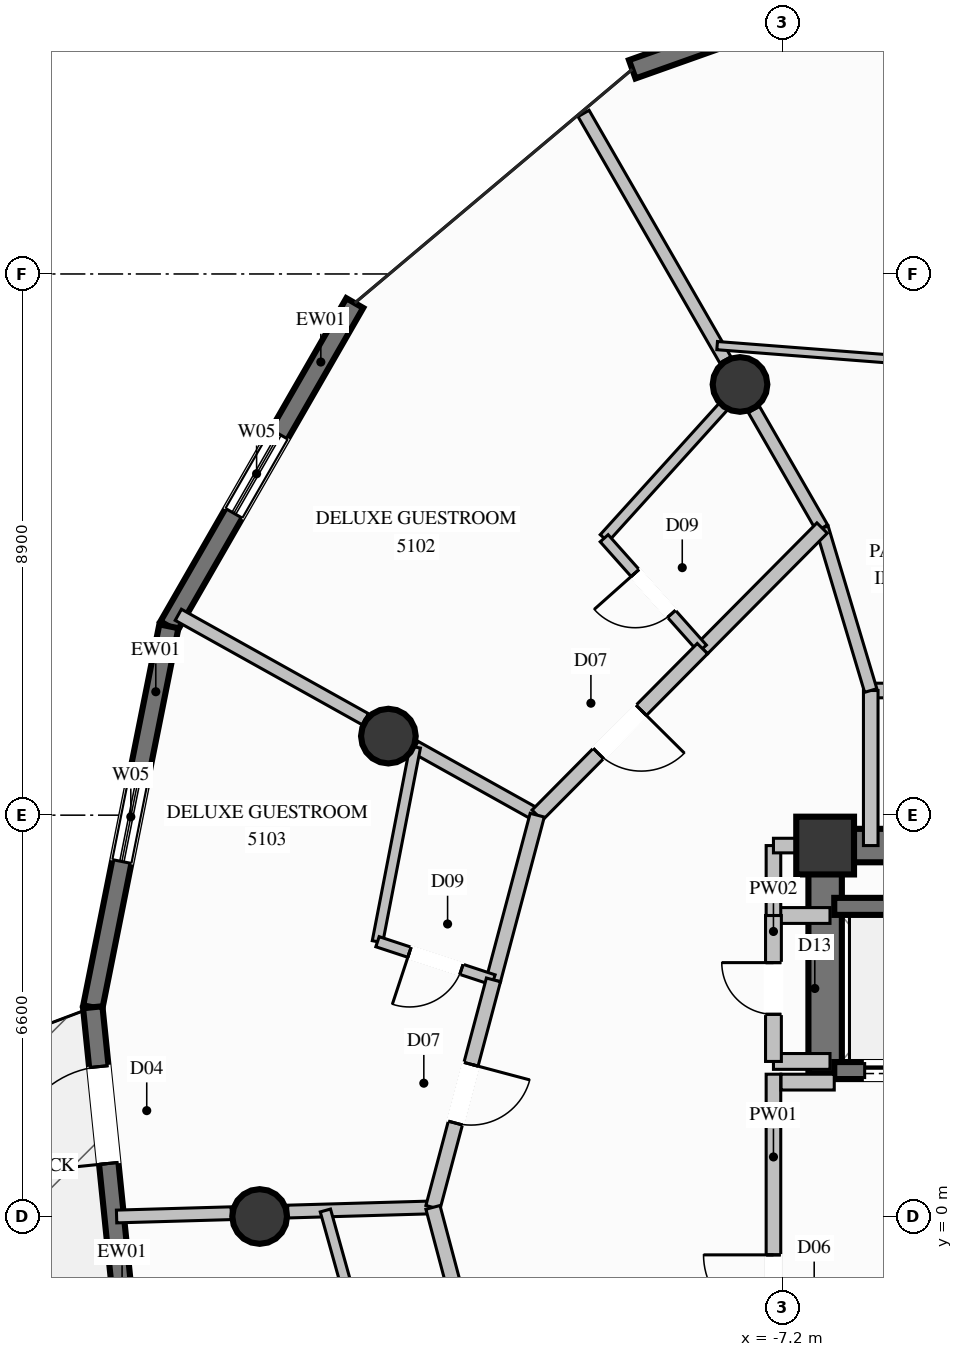
"""IFC4 building model, lengths in metres.
Left out: names, types, materials, properties, quantities, classifications, styles, units other than length and angle.
Written with IfcOpenShell. Run it as: python <this file> out.ifc"""

import sys

from ifc_helpers import new_model, si_unit, direction, frame, frame_2d, origin, origin_2d, place, context, subcontext, project, spatial, rectangle, circle, extrude, element, fill, save


model = new_model("IFC4")
c1 = context("Model", 3, precision=1e-05, world=origin(), true_north=direction((0.0, 1.0)))
c2 = subcontext(c1, "Body", "Model", "MODEL_VIEW")
j1 = project(units=[si_unit("LENGTHUNIT", "METRE"), si_unit("PLANEANGLEUNIT", "RADIAN")], contexts=[c1])
p1 = place(None, origin())
s1 = spatial("IfcSite", under=j1, at=p1, CompositionType="ELEMENT")
p2 = place(p1, origin())
s2 = spatial("IfcBuilding", under=s1, at=p2, CompositionType="ELEMENT")
p3 = place(p2, frame((0.0, 0.0, 191.2)))
s3 = spatial("IfcBuildingStorey", under=s2, at=p3, CompositionType="ELEMENT", Elevation=191.2)
p4 = place(p3, frame((-6.5, 6.1, 0.0), z_axis=(0.0, 0.0, 1.0), x_axis=(1.0, 0.0, 0.0)))
e1 = element("IfcColumn", 1, at=p4, inside=s3, PredefinedType="COLUMN", context=c2, shape_type="SweptSolid", body=[
    extrude(rectangle(XDim=0.95, YDim=0.95, at=origin_2d()), origin(), (0.0, 0.0, 1.0), 3.6),
])
p5 = place(p3, frame((-6.225, 6.1, 0.0), z_axis=(0.0, 0.0, 1.0), x_axis=(1.0, 0.0, 0.0)))
e2 = element("IfcWall", 2, at=p5, inside=s3, PredefinedType="SHEAR", context=c2, shape_type="SweptSolid", body=[
    extrude(rectangle(XDim=2.625, YDim=0.55, at=frame_2d((1.312, 0.0))), origin(), (0.0, 0.0, 1.0), 3.6),
])
p6 = place(p3, frame((-6.5, 2.35, 0.0), z_axis=(0.0, 0.0, 1.0), x_axis=(0.0, 1.0, 0.0)))
e3 = element("IfcWall", 3, at=p6, inside=s3, PredefinedType="SHEAR", context=c2, shape_type="SweptSolid", body=[
    extrude(rectangle(XDim=4.025, YDim=0.55, at=frame_2d((2.012, 0.0))), origin(), (0.0, 0.0, 1.0), 3.6),
])
for number, where, z_axis, x_axis in (
    (4, (-7.9, 13.683, 0.0), (0.0, 0.0, 1.0), (1.0, 0.0, 0.0)),
    (5, (-13.683, 7.9, 0.0), (0.0, 0.0, 1.0), (1.0, 0.0, 0.0)),
    (6, (-15.8, 0.0, 0.0), (0.0, 0.0, 1.0), (1.0, 0.0, 0.0)),
):
    element("IfcColumn", number, at=place(p3, frame(where, z_axis=z_axis, x_axis=x_axis)), inside=s3, PredefinedType="COLUMN", context=c2, shape_type="SweptSolid", body=[
        extrude(circle(Radius=0.45, at=origin_2d()), origin(), (0.0, 0.0, 1.0), 3.6),
    ])
p7 = place(p3, frame((-9.672, 18.866, 0.0), z_axis=(0.0, 0.0, 1.0), x_axis=(0.942262899703, 0.334874047732, 0.0)))
e7 = element("IfcWall", 7, at=p7, inside=s3, PredefinedType="SOLIDWALL", context=c2, shape_type="SweptSolid", body=[
    extrude(rectangle(XDim=5.967, YDim=0.32, at=frame_2d((2.983, 0.0))), origin(), (0.0, 0.0, 1.0), 3.36),
])
p8 = place(p7, frame((2.083, 0.0, 0.35)))
e8 = element("IfcOpeningElement", 8, at=p8, cuts=e7, PredefinedType="OPENING", context=c2, shape_type="SweptSolid", body=[
    extrude(rectangle(XDim=1.8, YDim=2.6, at=frame_2d((0.9, 1.3))), frame((0.0, 0.17, 0.0), z_axis=(0.0, -1.0, 0.0), x_axis=(1.0, 0.0, 0.0)), (0.0, 0.0, 1.0), 0.34),
])
p9 = place(p3, frame((-17.293, 9.706, 0.0), z_axis=(0.0, 0.0, 1.0), x_axis=(0.498499548546, 0.866889958472, 0.0)))
e9 = element("IfcWall", 9, at=p9, inside=s3, PredefinedType="SOLIDWALL", context=c2, shape_type="SweptSolid", body=[
    extrude(rectangle(XDim=6.132, YDim=0.32, at=frame_2d((3.066, 0.0))), origin(), (0.0, 0.0, 1.0), 3.36),
])
p10 = place(p9, frame((2.144, 0.0, 0.85)))
e10 = element("IfcOpeningElement", 10, at=p10, cuts=e9, PredefinedType="OPENING", context=c2, shape_type="SweptSolid", body=[
    extrude(rectangle(XDim=1.5, YDim=1.2, at=frame_2d((0.75, 0.6))), frame((0.0, 0.17, 0.0), z_axis=(0.0, -1.0, 0.0), x_axis=(1.0, 0.0, 0.0)), (0.0, 0.0, 1.0), 0.34),
])
p11 = place(p3, frame((-18.545, 3.441, 0.0), z_axis=(0.0, 0.0, 1.0), x_axis=(0.195954463574, 0.980612996144, 0.0)))
e11 = element("IfcWall", 11, at=p11, inside=s3, PredefinedType="SOLIDWALL", context=c2, shape_type="SweptSolid", body=[
    extrude(rectangle(XDim=6.389, YDim=0.32, at=frame_2d((3.194, 0.0))), origin(), (0.0, 0.0, 1.0), 3.36),
])
p12 = place(p11, frame((2.444, 0.0, 0.85)))
e12 = element("IfcOpeningElement", 12, at=p12, cuts=e11, PredefinedType="OPENING", context=c2, shape_type="SweptSolid", body=[
    extrude(rectangle(XDim=1.5, YDim=1.2, at=frame_2d((0.75, 0.6))), frame((0.0, 0.17, 0.0), z_axis=(0.0, -1.0, 0.0), x_axis=(1.0, 0.0, 0.0)), (0.0, 0.0, 1.0), 0.34),
])
p13 = place(p3, frame((-17.869, -3.161, 0.0), z_axis=(0.0, 0.0, 1.0), x_axis=(-0.101867372905, 0.994797988708, 0.0)))
e13 = element("IfcWall", 13, at=p13, inside=s3, PredefinedType="SOLIDWALL", context=c2, shape_type="SweptSolid", body=[
    extrude(rectangle(XDim=6.636, YDim=0.32, at=frame_2d((3.318, 0.0))), origin(), (0.0, 0.0, 1.0), 3.36),
])
p14 = place(p13, frame((4.055, 0.0, 0.0)))
e14 = element("IfcOpeningElement", 14, at=p14, cuts=e13, PredefinedType="OPENING", context=c2, shape_type="SweptSolid", body=[
    extrude(rectangle(XDim=1.6, YDim=2.3, at=frame_2d((0.8, 1.15))), frame((0.0, 0.17, 0.0), z_axis=(0.0, -1.0, 0.0), x_axis=(1.0, 0.0, 0.0)), (0.0, 0.0, 1.0), 0.34),
])
p15 = place(p3, frame((-6.35, 2.4, 0.0), z_axis=(0.0, 0.0, 1.0), x_axis=(1.0, 0.0, 0.0)))
e15 = element("IfcWall", 15, at=p15, inside=s3, PredefinedType="SOLIDWALL", context=c2, shape_type="SweptSolid", body=[
    extrude(rectangle(XDim=2.2, YDim=0.28, at=frame_2d((1.1, 0.0))), origin(), (0.0, 0.0, 1.0), 3.36),
])
p16 = place(p15, frame((0.5, 0.0, 0.0)))
e16 = element("IfcOpeningElement", 16, at=p16, cuts=e15, PredefinedType="OPENING", context=c2, shape_type="SweptSolid", body=[
    extrude(rectangle(XDim=1.2, YDim=2.2, at=frame_2d((0.6, 1.1))), frame((0.0, 0.15, 0.0), z_axis=(0.0, -1.0, 0.0), x_axis=(1.0, 0.0, 0.0)), (0.0, 0.0, 1.0), 0.3),
])
p17 = place(p3, frame((-4.15, 5.1, 0.0), z_axis=(0.0, 0.0, 1.0), x_axis=(-1.0, 0.0, 0.0)))
e17 = element("IfcWall", 17, at=p17, inside=s3, PredefinedType="SOLIDWALL", context=c2, shape_type="SweptSolid", body=[
    extrude(rectangle(XDim=2.2, YDim=0.28, at=frame_2d((1.1, 0.0))), origin(), (0.0, 0.0, 1.0), 3.36),
])
p18 = place(p3, frame((-7.35, -3.38, 0.0), z_axis=(0.0, 0.0, 1.0), x_axis=(0.0, 1.0, 0.0)))
e18 = element("IfcWall", 18, at=p18, inside=s3, PredefinedType="PARTITIONING", context=c2, shape_type="SweptSolid", body=[
    extrude(rectangle(XDim=5.72, YDim=0.24, at=frame_2d((2.86, 0.0))), origin(), (0.0, 0.0, 1.0), 2.445),
])
p19 = place(p18, frame((1.599, 0.0, 0.0)))
e19 = element("IfcOpeningElement", 19, at=p19, cuts=e18, PredefinedType="OPENING", context=c2, shape_type="SweptSolid", body=[
    extrude(rectangle(XDim=1.15, YDim=2.2, at=frame_2d((0.575, 1.1))), frame((0.0, 0.13, 0.0), z_axis=(0.0, -1.0, 0.0), x_axis=(1.0, 0.0, 0.0)), (0.0, 0.0, 1.0), 0.26),
])
p20 = place(p3, frame((-7.225, 2.21, 0.0), z_axis=(0.0, 0.0, 1.0), x_axis=(1.0, 0.0, 0.0)))
e20 = element("IfcWall", 20, at=p20, inside=s3, PredefinedType="PARTITIONING", context=c2, shape_type="SweptSolid", body=[
    extrude(rectangle(XDim=0.875, YDim=0.26, at=frame_2d((0.438, 0.0))), origin(), (0.0, 0.0, 1.0), 3.36),
])
for number, where, z_axis, x_axis in (
    (21, (-7.35, 4.95, 0.0), (0.0, 0.0, 1.0), (1.0, 0.0, 0.0)),
    (22, (-7.35, 2.55, 0.0), (0.0, 0.0, 1.0), (1.0, 0.0, 0.0)),
):
    element("IfcWall", number, at=place(p3, frame(where, z_axis=z_axis, x_axis=x_axis)), inside=s3, PredefinedType="PARTITIONING", context=c2, shape_type="SweptSolid", body=[
        extrude(rectangle(XDim=0.93, YDim=0.26, at=frame_2d((0.465, 0.0))), origin(), (0.0, 0.0, 1.0), 3.36),
    ])
p21 = place(p3, frame((-7.35, 2.55, 0.0), z_axis=(0.0, 0.0, 1.0), x_axis=(0.0, 1.0, 0.0)))
e23 = element("IfcWall", 23, at=p21, inside=s3, PredefinedType="PARTITIONING", context=c2, shape_type="SweptSolid", body=[
    extrude(rectangle(XDim=2.4, YDim=0.26, at=frame_2d((1.2, 0.0))), origin(), (0.0, 0.0, 1.0), 2.445),
])
p22 = place(p21, frame((0.775, 0.0, 0.0)))
e24 = element("IfcOpeningElement", 24, at=p22, cuts=e23, PredefinedType="OPENING", context=c2, shape_type="SweptSolid", body=[
    extrude(rectangle(XDim=0.85, YDim=2.05, at=frame_2d((0.425, 1.025))), frame((0.0, 0.14, 0.0), z_axis=(0.0, -1.0, 0.0), x_axis=(1.0, 0.0, 0.0)), (0.0, 0.0, 1.0), 0.28),
])
p23 = place(p3, frame((-5.75, 8.65, 0.0), z_axis=(0.0, 0.0, 1.0), x_axis=(1.0, 0.0, 0.0)))
e25 = element("IfcWall", 25, at=p23, inside=s3, PredefinedType="PARTITIONING", context=c2, shape_type="SweptSolid", body=[
    extrude(rectangle(XDim=13.1, YDim=0.24, at=frame_2d((6.55, 0.0))), origin(), (0.0, 0.0, 1.0), 3.36),
])
p24 = place(p3, frame((-5.75, 6.1, 0.0), z_axis=(0.0, 0.0, 1.0), x_axis=(0.0, 1.0, 0.0)))
e26 = element("IfcWall", 26, at=p24, inside=s3, PredefinedType="PARTITIONING", context=c2, shape_type="SweptSolid", body=[
    extrude(rectangle(XDim=2.55, YDim=0.24, at=frame_2d((1.275, 0.0))), origin(), (0.0, 0.0, 1.0), 3.36),
])
p25 = place(p3, frame((-7.35, 4.95, 0.0), z_axis=(0.0, 0.0, 1.0), x_axis=(0.0, 1.0, 0.0)))
e27 = element("IfcWall", 27, at=p25, inside=s3, PredefinedType="PARTITIONING", context=c2, shape_type="SweptSolid", body=[
    extrude(rectangle(XDim=1.15, YDim=0.24, at=frame_2d((0.575, 0.0))), origin(), (0.0, 0.0, 1.0), 2.445),
])
p26 = place(p3, frame((-7.35, 6.1, 0.0), z_axis=(0.0, 0.0, 1.0), x_axis=(1.0, 0.0, 0.0)))
e28 = element("IfcWall", 28, at=p26, inside=s3, PredefinedType="PARTITIONING", context=c2, shape_type="SweptSolid", body=[
    extrude(rectangle(XDim=0.85, YDim=0.24, at=frame_2d((0.425, 0.0))), origin(), (0.0, 0.0, 1.0), 2.876),
])
p27 = place(p3, frame((-6.55, 11.322, 0.0), z_axis=(0.0, 0.0, 1.0), x_axis=(-0.498754501597, 0.866743299447, 0.0)))
e29 = element("IfcWall", 29, at=p27, inside=s3, PredefinedType="PARTITIONING", context=c2, shape_type="SweptSolid", body=[
    extrude(rectangle(XDim=2.25, YDim=0.21, at=frame_2d((1.125, 0.0))), origin(), (0.0, 0.0, 1.0), 2.876),
])
p28 = place(p3, frame((-8.141, 14.087, 0.0), z_axis=(0.0, 0.0, 1.0), x_axis=(-0.498683982258, 0.866783874931, 0.0)))
e30 = element("IfcWall", 30, at=p28, inside=s3, PredefinedType="PARTITIONING", context=c2, shape_type="SweptSolid", body=[
    extrude(rectangle(XDim=4.676, YDim=0.21, at=frame_2d((2.338, 0.0))), origin(), (0.0, 0.0, 1.0), 3.36),
])
p29 = place(p3, frame((-11.235, 6.6, 0.0), z_axis=(0.0, 0.0, 1.0), x_axis=(-0.873226015114, 0.487315428165, 0.0)))
e31 = element("IfcWall", 31, at=p29, inside=s3, PredefinedType="PARTITIONING", context=c2, shape_type="SweptSolid", body=[
    extrude(rectangle(XDim=2.304, YDim=0.21, at=frame_2d((1.152, 0.0))), origin(), (0.0, 0.0, 1.0), 2.876),
])
p30 = place(p3, frame((-14.062, 8.178, 0.0), z_axis=(0.0, 0.0, 1.0), x_axis=(-0.87316820668, 0.487419001316, 0.0)))
e32 = element("IfcWall", 32, at=p30, inside=s3, PredefinedType="PARTITIONING", context=c2, shape_type="SweptSolid", body=[
    extrude(rectangle(XDim=3.523, YDim=0.21, at=frame_2d((1.761, 0.0))), origin(), (0.0, 0.0, 1.0), 3.36),
])
p31 = place(p3, frame((-12.95, 0.15, 0.0), z_axis=(0.0, 0.0, 1.0), x_axis=(-0.999584294169, -0.028831213149, 0.0)))
e33 = element("IfcWall", 33, at=p31, inside=s3, PredefinedType="PARTITIONING", context=c2, shape_type="SweptSolid", body=[
    extrude(rectangle(XDim=2.388, YDim=0.21, at=frame_2d((1.194, 0.0))), origin(), (0.0, 0.0, 1.0), 2.42),
])
p32 = place(p3, frame((-16.267, 0.054, 0.0), z_axis=(0.0, 0.0, 1.0), x_axis=(-0.999591030339, -0.028596714266, 0.0)))
e34 = element("IfcWall", 34, at=p32, inside=s3, PredefinedType="PARTITIONING", context=c2, shape_type="SweptSolid", body=[
    extrude(rectangle(XDim=1.887, YDim=0.21, at=frame_2d((0.943, 0.0))), origin(), (0.0, 0.0, 1.0), 2.42),
])
p33 = place(p3, frame((-6.55, 11.322, 0.0), z_axis=(0.0, 0.0, 1.0), x_axis=(0.286825893059, -0.957982727961, 0.0)))
e35 = element("IfcWall", 35, at=p33, inside=s3, PredefinedType="PARTITIONING", context=c2, shape_type="SweptSolid", body=[
    extrude(rectangle(XDim=2.789, YDim=0.21, at=frame_2d((1.395, 0.0))), origin(), (0.0, 0.0, 1.0), 3.36),
])
p34 = place(p3, frame((-8.276, 14.322, 0.0), z_axis=(0.0, 0.0, 1.0), x_axis=(0.997018431195, -0.077163772963, 0.0)))
e36 = element("IfcWall", 36, at=p34, inside=s3, PredefinedType="PARTITIONING", context=c2, shape_type="SweptSolid", body=[
    extrude(rectangle(XDim=10.628, YDim=0.135, at=frame_2d((5.314, 0.0))), origin(), (0.0, 0.0, 1.0), 3.36),
])
p35 = place(p34, frame((4.839, 0.0, 0.0)))
e37 = element("IfcOpeningElement", 37, at=p35, cuts=e36, PredefinedType="OPENING", context=c2, shape_type="SweptSolid", body=[
    extrude(rectangle(XDim=0.95, YDim=2.1, at=frame_2d((0.475, 1.05))), frame((0.0, 0.078, 0.0), z_axis=(0.0, -1.0, 0.0), x_axis=(1.0, 0.0, 0.0)), (0.0, 0.0, 1.0), 0.155),
])
p36 = place(p3, frame((-6.55, 11.322, 0.0), z_axis=(0.0, 0.0, 1.0), x_axis=(-0.704436417235, -0.709767098472, 0.0)))
e38 = element("IfcWall", 38, at=p36, inside=s3, PredefinedType="PARTITIONING", context=c2, shape_type="SweptSolid", body=[
    extrude(rectangle(XDim=2.794, YDim=0.24, at=frame_2d((1.397, 0.0))), origin(), (0.0, 0.0, 1.0), 3.36),
])
p37 = place(p3, frame((-7.884, 13.64, 0.0), z_axis=(0.0, 0.0, 1.0), x_axis=(-0.671062027172, -0.74140121101, 0.0)))
e39 = element("IfcWall", 39, at=p37, inside=s3, PredefinedType="PLUMBINGWALL", context=c2, shape_type="SweptSolid", body=[
    extrude(rectangle(XDim=3.353, YDim=0.175, at=frame_2d((1.676, 0.0))), origin(), (0.0, 0.0, 1.0), 2.929),
])
p38 = place(p3, frame((-8.518, 9.339, 0.0), z_axis=(0.0, 0.0, 1.0), x_axis=(-0.664980955203, 0.746860314395, 0.0)))
e40 = element("IfcWall", 40, at=p38, inside=s3, PredefinedType="PLUMBINGWALL", context=c2, shape_type="SweptSolid", body=[
    extrude(rectangle(XDim=2.43, YDim=0.175, at=frame_2d((1.215, 0.0))), origin(), (0.0, 0.0, 1.0), 3.36),
])
p39 = place(p38, frame((0.765, 0.0, 0.0)))
e41 = element("IfcOpeningElement", 41, at=p39, cuts=e40, PredefinedType="OPENING", context=c2, shape_type="SweptSolid", body=[
    extrude(rectangle(XDim=0.9, YDim=2.1, at=frame_2d((0.45, 1.05))), frame((0.0, 0.098, 0.0), z_axis=(0.0, -1.0, 0.0), x_axis=(1.0, 0.0, 0.0)), (0.0, 0.0, 1.0), 0.195),
])
p40 = place(p3, frame((-8.518, 9.339, 0.0), z_axis=(0.0, 0.0, 1.0), x_axis=(-0.7042534056, -0.70994868878, 0.0)))
e42 = element("IfcWall", 42, at=p40, inside=s3, PredefinedType="PARTITIONING", context=c2, shape_type="SweptSolid", body=[
    extrude(rectangle(XDim=3.858, YDim=0.24, at=frame_2d((1.929, 0.0))), origin(), (0.0, 0.0, 1.0), 3.36),
])
p41 = place(p40, frame((1.429, 0.0, 0.0)))
e43 = element("IfcOpeningElement", 43, at=p41, cuts=e42, PredefinedType="OPENING", context=c2, shape_type="SweptSolid", body=[
    extrude(rectangle(XDim=1.0, YDim=2.2, at=frame_2d((0.5, 1.1))), frame((0.0, 0.13, 0.0), z_axis=(0.0, -1.0, 0.0), x_axis=(1.0, 0.0, 0.0)), (0.0, 0.0, 1.0), 0.26),
])
p42 = place(p3, frame((-11.235, 6.6, 0.0), z_axis=(0.0, 0.0, 1.0), x_axis=(-0.25685481711, -0.966450000221, 0.0)))
e44 = element("IfcWall", 44, at=p42, inside=s3, PredefinedType="PARTITIONING", context=c2, shape_type="SweptSolid", body=[
    extrude(rectangle(XDim=2.803, YDim=0.24, at=frame_2d((1.401, 0.0))), origin(), (0.0, 0.0, 1.0), 3.36),
])
p43 = place(p3, frame((-13.242, 7.72, 0.0), z_axis=(0.0, 0.0, 1.0), x_axis=(-0.190194194324, -0.981746488889, 0.0)))
e45 = element("IfcWall", 45, at=p43, inside=s3, PredefinedType="PLUMBINGWALL", context=c2, shape_type="SweptSolid", body=[
    extrude(rectangle(XDim=3.26, YDim=0.175, at=frame_2d((1.63, 0.0))), origin(), (0.0, 0.0, 1.0), 2.929),
])
p44 = place(p3, frame((-11.955, 3.891, 0.0), z_axis=(0.0, 0.0, 1.0), x_axis=(-0.949832185547, 0.312760002717, 0.0)))
e46 = element("IfcWall", 46, at=p44, inside=s3, PredefinedType="PLUMBINGWALL", context=c2, shape_type="SweptSolid", body=[
    extrude(rectangle(XDim=2.008, YDim=0.175, at=frame_2d((1.004, 0.0))), origin(), (0.0, 0.0, 1.0), 3.36),
])
p45 = place(p44, frame((0.554, 0.0, 0.0)))
e47 = element("IfcOpeningElement", 47, at=p45, cuts=e46, PredefinedType="OPENING", context=c2, shape_type="SweptSolid", body=[
    extrude(rectangle(XDim=0.9, YDim=2.1, at=frame_2d((0.45, 1.05))), frame((0.0, 0.098, 0.0), z_axis=(0.0, -1.0, 0.0), x_axis=(1.0, 0.0, 0.0)), (0.0, 0.0, 1.0), 0.195),
])
p46 = place(p3, frame((-11.955, 3.891, 0.0), z_axis=(0.0, 0.0, 1.0), x_axis=(-0.256991373998, -0.96641369697, 0.0)))
e48 = element("IfcWall", 48, at=p46, inside=s3, PredefinedType="PARTITIONING", context=c2, shape_type="SweptSolid", body=[
    extrude(rectangle(XDim=3.871, YDim=0.24, at=frame_2d((1.936, 0.0))), origin(), (0.0, 0.0, 1.0), 3.36),
])
p47 = place(p46, frame((1.436, 0.0, 0.0)))
e49 = element("IfcOpeningElement", 49, at=p47, cuts=e48, PredefinedType="OPENING", context=c2, shape_type="SweptSolid", body=[
    extrude(rectangle(XDim=1.0, YDim=2.2, at=frame_2d((0.5, 1.1))), frame((0.0, 0.13, 0.0), z_axis=(0.0, -1.0, 0.0), x_axis=(1.0, 0.0, 0.0)), (0.0, 0.0, 1.0), 0.26),
])
p48 = place(p3, frame((-12.95, 0.15, 0.0), z_axis=(0.0, 0.0, 1.0), x_axis=(0.25685481711, -0.966450000221, 0.0)))
e50 = element("IfcWall", 50, at=p48, inside=s3, PredefinedType="PARTITIONING", context=c2, shape_type="SweptSolid", body=[
    extrude(rectangle(XDim=2.803, YDim=0.24, at=frame_2d((1.401, 0.0))), origin(), (0.0, 0.0, 1.0), 3.36),
])
p49 = place(p3, frame((-14.719, 0.099, 0.0), z_axis=(0.0, 0.0, 1.0), x_axis=(0.268676474021, -0.963230477252, 0.0)))
e51 = element("IfcWall", 51, at=p49, inside=s3, PredefinedType="PLUMBINGWALL", context=c2, shape_type="SweptSolid", body=[
    extrude(rectangle(XDim=3.182, YDim=0.175, at=frame_2d((1.591, 0.0))), origin(), (0.0, 0.0, 1.0), 3.36),
])
p50 = place(p10, origin())
e52 = element("IfcWindow", 52, at=p50, inside=s3, PartitioningType="SINGLE_PANEL", PredefinedType="WINDOW", context=c2, shape_type="SweptSolid", body=[
    extrude(rectangle(XDim=1.5, YDim=1.2, at=frame_2d((0.75, 0.6))), frame((0.0, 0.03, 0.0), z_axis=(0.0, -1.0, 0.0), x_axis=(1.0, 0.0, 0.0)), (0.0, 0.0, 1.0), 0.06),
])
fill(e10, e52)
p51 = place(p12, origin())
e53 = element("IfcWindow", 53, at=p51, inside=s3, PartitioningType="SINGLE_PANEL", PredefinedType="WINDOW", context=c2, shape_type="SweptSolid", body=[
    extrude(rectangle(XDim=1.5, YDim=1.2, at=frame_2d((0.75, 0.6))), frame((0.0, 0.03, 0.0), z_axis=(0.0, -1.0, 0.0), x_axis=(1.0, 0.0, 0.0)), (0.0, 0.0, 1.0), 0.06),
])
fill(e12, e53)
p52 = place(p14, origin())
e54 = element("IfcDoor", 54, at=p52, inside=s3, OperationType="SINGLE_SWING_LEFT", PredefinedType="DOOR", context=c2, shape_type="SweptSolid", body=[
    extrude(rectangle(XDim=1.6, YDim=2.3, at=frame_2d((0.8, 1.15))), frame((0.0, 0.025, 0.0), z_axis=(0.0, -1.0, 0.0), x_axis=(1.0, 0.0, 0.0)), (0.0, 0.0, 1.0), 0.05),
])
fill(e14, e54)
p53 = place(p16, origin())
e55 = element("IfcDoor", 55, at=p53, inside=s3, OperationType="SLIDING_TO_LEFT", PredefinedType="DOOR", context=c2, shape_type="SweptSolid", body=[
    extrude(rectangle(XDim=1.2, YDim=2.2, at=frame_2d((0.6, 1.1))), frame((0.0, 0.025, 0.0), z_axis=(0.0, -1.0, 0.0), x_axis=(1.0, 0.0, 0.0)), (0.0, 0.0, 1.0), 0.05),
])
fill(e16, e55)
p54 = place(p19, origin())
e56 = element("IfcDoor", 56, at=p54, inside=s3, OperationType="SINGLE_SWING_RIGHT", PredefinedType="DOOR", context=c2, shape_type="SweptSolid", body=[
    extrude(rectangle(XDim=1.15, YDim=2.2, at=frame_2d((0.575, 1.1))), frame((0.0, 0.025, 0.0), z_axis=(0.0, -1.0, 0.0), x_axis=(1.0, 0.0, 0.0)), (0.0, 0.0, 1.0), 0.05),
])
fill(e19, e56)
p55 = place(p22, origin())
e57 = element("IfcDoor", 57, at=p55, inside=s3, OperationType="SINGLE_SWING_RIGHT", PredefinedType="DOOR", context=c2, shape_type="SweptSolid", body=[
    extrude(rectangle(XDim=0.85, YDim=2.05, at=frame_2d((0.425, 1.025))), frame((0.0, 0.025, 0.0), z_axis=(0.0, -1.0, 0.0), x_axis=(1.0, 0.0, 0.0)), (0.0, 0.0, 1.0), 0.05),
])
fill(e24, e57)
p56 = place(p39, origin())
e58 = element("IfcDoor", 58, at=p56, inside=s3, OperationType="SINGLE_SWING_RIGHT", PredefinedType="DOOR", context=c2, shape_type="SweptSolid", body=[
    extrude(rectangle(XDim=0.9, YDim=2.1, at=frame_2d((0.45, 1.05))), frame((0.0, 0.025, 0.0), z_axis=(0.0, -1.0, 0.0), x_axis=(1.0, 0.0, 0.0)), (0.0, 0.0, 1.0), 0.05),
])
fill(e41, e58)
p57 = place(p41, origin())
e59 = element("IfcDoor", 59, at=p57, inside=s3, OperationType="SINGLE_SWING_LEFT", PredefinedType="DOOR", context=c2, shape_type="SweptSolid", body=[
    extrude(rectangle(XDim=1.0, YDim=2.2, at=frame_2d((0.5, 1.1))), frame((0.0, 0.025, 0.0), z_axis=(0.0, -1.0, 0.0), x_axis=(1.0, 0.0, 0.0)), (0.0, 0.0, 1.0), 0.05),
])
fill(e43, e59)
p58 = place(p45, origin())
e60 = element("IfcDoor", 60, at=p58, inside=s3, OperationType="SINGLE_SWING_RIGHT", PredefinedType="DOOR", context=c2, shape_type="SweptSolid", body=[
    extrude(rectangle(XDim=0.9, YDim=2.1, at=frame_2d((0.45, 1.05))), frame((0.0, 0.025, 0.0), z_axis=(0.0, -1.0, 0.0), x_axis=(1.0, 0.0, 0.0)), (0.0, 0.0, 1.0), 0.05),
])
fill(e47, e60)
p59 = place(p47, origin())
e61 = element("IfcDoor", 61, at=p59, inside=s3, OperationType="SINGLE_SWING_LEFT", PredefinedType="DOOR", context=c2, shape_type="SweptSolid", body=[
    extrude(rectangle(XDim=1.0, YDim=2.2, at=frame_2d((0.5, 1.1))), frame((0.0, 0.025, 0.0), z_axis=(0.0, -1.0, 0.0), x_axis=(1.0, 0.0, 0.0)), (0.0, 0.0, 1.0), 0.05),
])
fill(e49, e61)
save(model, sys.argv[1])
